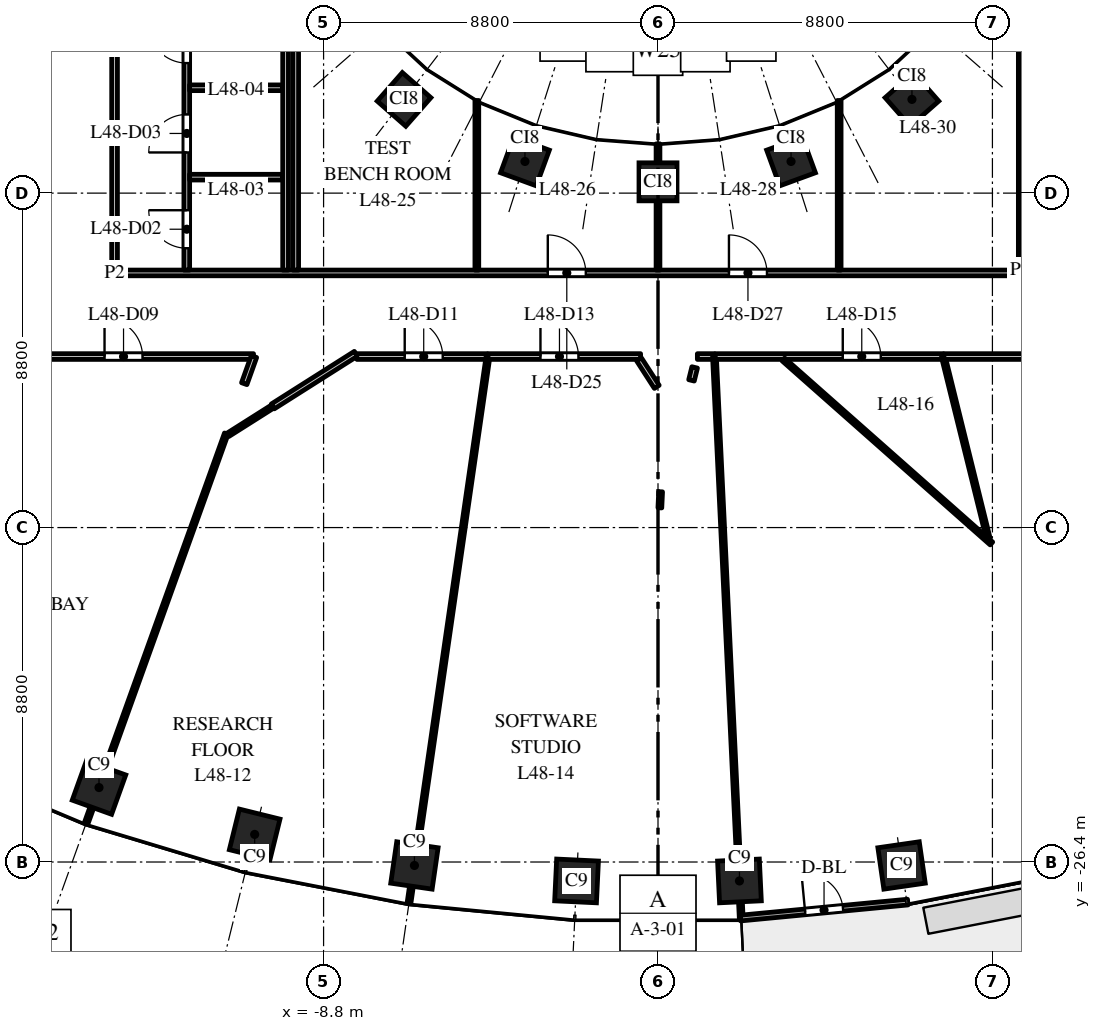
"""IFC4 building model, lengths in metres.
Left out: names, types, materials, properties, quantities, classifications, styles, units other than length and angle.
Written with IfcOpenShell. Run it as: python <this file> out.ifc"""

import sys

from ifc_helpers import new_model, si_unit, direction, frame, frame_2d, origin, origin_2d, place, context, subcontext, project, spatial, rectangle, extrude, element, fill, save


model = new_model("IFC4")
c1 = context("Model", 3, precision=1e-05, world=origin(), true_north=direction((0.0, 1.0)))
c2 = subcontext(c1, "Body", "Model", "MODEL_VIEW")
j1 = project(units=[si_unit("LENGTHUNIT", "METRE"), si_unit("PLANEANGLEUNIT", "RADIAN")], contexts=[c1])
p1 = place(None, origin())
s1 = spatial("IfcSite", under=j1, at=p1, CompositionType="ELEMENT")
p2 = place(p1, origin())
s2 = spatial("IfcBuilding", under=s1, at=p2, CompositionType="ELEMENT")
p3 = place(p2, frame((0.0, 0.0, 233.5)))
s3 = spatial("IfcBuildingStorey", under=s2, at=p3, CompositionType="ELEMENT", Elevation=233.5)
for number, where, z_axis, x_axis in (
    (1, (-14.709, -24.441, 0.0), (0.0, 0.0, 1.0), (0.941, -0.338, 0.0)),
    (2, (-10.613, -25.674, 0.0), (0.0, 0.0, 1.0), (0.971, -0.24, 0.0)),
    (3, (-6.409, -26.491, 0.0), (0.0, 0.0, 1.0), (0.99, -0.143, 0.0)),
    (4, (-2.143, -26.898, 0.0), (0.0, 0.0, 1.0), (0.999, -0.048, 0.0)),
    (5, (2.143, -26.898, 0.0), (0.0, 0.0, 1.0), (0.999, 0.048, 0.0)),
    (6, (6.409, -26.491, 0.0), (0.0, 0.0, 1.0), (0.99, 0.143, 0.0)),
):
    element("IfcColumn", number, at=place(p3, frame(where, z_axis=z_axis, x_axis=x_axis)), inside=s3, PredefinedType="COLUMN", context=c2, shape_type="SweptSolid", body=[
        extrude(rectangle(XDim=1.1, YDim=1.1, at=origin_2d()), origin(), (0.0, 0.0, 1.0), 4.0),
    ])
for number, where, z_axis, x_axis in (
    (7, (-6.682, -6.334, 0.0), (0.0, 0.0, 1.0), (0.751, -0.66, 0.0)),
    (8, (-3.501, -7.967, 0.0), (0.0, 0.0, 1.0), (0.939, -0.344, 0.0)),
    (9, (0.0, -8.503, 0.0), (0.0, 0.0, 1.0), (1.0, 0.0, 0.0)),
    (10, (3.501, -7.967, 0.0), (0.0, 0.0, 1.0), (0.939, 0.344, 0.0)),
    (11, (6.682, -6.334, 0.0), (0.0, 0.0, 1.0), (0.751, 0.66, 0.0)),
):
    element("IfcColumn", number, at=place(p3, frame(where, z_axis=z_axis, x_axis=x_axis)), inside=s3, PredefinedType="COLUMN", context=c2, shape_type="SweptSolid", body=[
        extrude(rectangle(XDim=1.0, YDim=1.0, at=origin_2d()), origin(), (0.0, 0.0, 1.0), 4.0),
    ])
p4 = place(p3, frame((2.166, -27.875, 0.0), z_axis=(0.0, 0.0, 1.0), x_axis=(0.995473879823, 0.095035543824, 0.0)))
e12 = element("IfcWall", 12, at=p4, inside=s3, PredefinedType="STANDARD", context=c2, shape_type="SweptSolid", body=[
    extrude(rectangle(XDim=4.426, YDim=0.15, at=frame_2d((2.213, 0.0))), origin(), (0.0, 0.0, 1.0), 3.7),
])
p5 = place(p4, frame((1.713, 0.0, 0.0)))
e13 = element("IfcOpeningElement", 13, at=p5, cuts=e12, PredefinedType="OPENING", context=c2, shape_type="SweptSolid", body=[
    extrude(rectangle(XDim=1.0, YDim=2.4, at=frame_2d((0.5, 1.2))), frame((0.0, 0.085, 0.0), z_axis=(0.0, -1.0, 0.0), x_axis=(1.0, 0.0, 0.0)), (0.0, 0.0, 1.0), 0.17),
])
p6 = place(p3, frame((-24.0, -13.1, 0.0), z_axis=(0.0, 0.0, 1.0), x_axis=(1.0, 0.0, 0.0)))
e14 = element("IfcWall", 14, at=p6, inside=s3, PredefinedType="PARTITIONING", context=c2, shape_type="SweptSolid", body=[
    extrude(rectangle(XDim=13.357, YDim=0.15, at=frame_2d((6.678, 0.0))), origin(), (0.0, 0.0, 1.0), 2.75),
])
p7 = place(p6, frame((9.436, 0.0, 0.0)))
e15 = element("IfcOpeningElement", 15, at=p7, cuts=e14, PredefinedType="OPENING", context=c2, shape_type="SweptSolid", body=[
    extrude(rectangle(XDim=1.0, YDim=2.1, at=frame_2d((0.5, 1.05))), frame((0.0, 0.085, 0.0), z_axis=(0.0, -1.0, 0.0), x_axis=(1.0, 0.0, 0.0)), (0.0, 0.0, 1.0), 0.17),
])
p8 = place(p3, frame((-15.048, -25.383, 0.0), z_axis=(0.0, 0.0, 1.0), x_axis=(0.338406105684, 0.941000163462, 0.0)))
e16 = element("IfcWall", 16, at=p8, inside=s3, PredefinedType="PARTITIONING", context=c2, shape_type="SweptSolid", body=[
    extrude(rectangle(XDim=10.898, YDim=0.1, at=frame_2d((5.449, 0.0))), origin(), (0.0, 0.0, 1.0), 3.0),
])
p9 = place(p3, frame((-14.3, -10.9, 0.0), z_axis=(0.0, 0.0, 1.0), x_axis=(0.0, 1.0, 0.0)))
e17 = element("IfcWall", 17, at=p9, inside=s3, PredefinedType="PARTITIONING", context=c2, shape_type="SweptSolid", body=[
    extrude(rectangle(XDim=21.8, YDim=0.15, at=frame_2d((10.9, 0.0))), origin(), (0.0, 0.0, 1.0), 2.75),
])
p10 = place(p9, frame((10.4, 0.0, 0.0)))
e18 = element("IfcOpeningElement", 18, at=p10, cuts=e17, PredefinedType="OPENING", context=c2, shape_type="SweptSolid", body=[
    extrude(rectangle(XDim=1.0, YDim=2.1, at=frame_2d((0.5, 1.05))), frame((0.0, 0.085, 0.0), z_axis=(0.0, -1.0, 0.0), x_axis=(1.0, 0.0, 0.0)), (0.0, 0.0, 1.0), 0.17),
])
p11 = place(p3, frame((-14.3, -10.9, 0.0), z_axis=(0.0, 0.0, 1.0), x_axis=(1.0, 0.0, 0.0)))
e19 = element("IfcWall", 19, at=p11, inside=s3, PredefinedType="PARTITIONING", context=c2, shape_type="SweptSolid", body=[
    extrude(rectangle(XDim=28.6, YDim=0.15, at=frame_2d((14.3, 0.0))), origin(), (0.0, 0.0, 1.0), 2.85),
])
p12 = place(p11, frame((11.4, 0.0, 0.0)))
e20 = element("IfcOpeningElement", 20, at=p12, cuts=e19, PredefinedType="OPENING", context=c2, shape_type="SweptSolid", body=[
    extrude(rectangle(XDim=1.0, YDim=2.1, at=frame_2d((0.5, 1.05))), frame((0.0, 0.085, 0.0), z_axis=(0.0, -1.0, 0.0), x_axis=(1.0, 0.0, 0.0)), (0.0, 0.0, 1.0), 0.17),
])
p13 = place(p11, frame((16.167, 0.0, 0.0)))
e21 = element("IfcOpeningElement", 21, at=p13, cuts=e19, PredefinedType="OPENING", context=c2, shape_type="SweptSolid", body=[
    extrude(rectangle(XDim=1.0, YDim=2.1, at=frame_2d((0.5, 1.05))), frame((0.0, 0.085, 0.0), z_axis=(0.0, -1.0, 0.0), x_axis=(1.0, 0.0, 0.0)), (0.0, 0.0, 1.0), 0.17),
])
p14 = place(p3, frame((-12.4, -10.825, 0.0), z_axis=(0.0, 0.0, 1.0), x_axis=(0.0, 1.0, 0.0)))
e22 = element("IfcWall", 22, at=p14, inside=s3, PredefinedType="PARTITIONING", context=c2, shape_type="SweptSolid", body=[
    extrude(rectangle(XDim=7.065, YDim=0.15, at=frame_2d((3.532, 0.0))), origin(), (0.0, 0.0, 1.0), 2.75),
])
p15 = place(p14, frame((0.575, 0.0, 0.0)))
e23 = element("IfcOpeningElement", 23, at=p15, cuts=e22, PredefinedType="OPENING", context=c2, shape_type="SweptSolid", body=[
    extrude(rectangle(XDim=1.0, YDim=2.1, at=frame_2d((0.5, 1.05))), frame((0.0, 0.085, 0.0), z_axis=(0.0, -1.0, 0.0), x_axis=(1.0, 0.0, 0.0)), (0.0, 0.0, 1.0), 0.17),
])
p16 = place(p14, frame((3.095, 0.0, 0.0)))
e24 = element("IfcOpeningElement", 24, at=p16, cuts=e22, PredefinedType="OPENING", context=c2, shape_type="SweptSolid", body=[
    extrude(rectangle(XDim=1.0, YDim=2.1, at=frame_2d((0.5, 1.05))), frame((0.0, 0.085, 0.0), z_axis=(0.0, -1.0, 0.0), x_axis=(1.0, 0.0, 0.0)), (0.0, 0.0, 1.0), 0.17),
])
p17 = place(p14, frame((5.447, 0.0, 0.0)))
e25 = element("IfcOpeningElement", 25, at=p17, cuts=e22, PredefinedType="OPENING", context=c2, shape_type="SweptSolid", body=[
    extrude(rectangle(XDim=1.0, YDim=2.1, at=frame_2d((0.5, 1.05))), frame((0.0, 0.085, 0.0), z_axis=(0.0, -1.0, 0.0), x_axis=(1.0, 0.0, 0.0)), (0.0, 0.0, 1.0), 0.17),
])
p18 = place(p3, frame((-12.325, -8.38, 0.0), z_axis=(0.0, 0.0, 1.0), x_axis=(1.0, 0.0, 0.0)))
e26 = element("IfcWall", 26, at=p18, inside=s3, PredefinedType="PARTITIONING", context=c2, shape_type="SweptSolid", body=[
    extrude(rectangle(XDim=2.45, YDim=0.15, at=frame_2d((1.225, 0.0))), origin(), (0.0, 0.0, 1.0), 2.75),
])
p19 = place(p3, frame((-12.325, -6.028, 0.0), z_axis=(0.0, 0.0, 1.0), x_axis=(1.0, 0.0, 0.0)))
e27 = element("IfcWall", 27, at=p19, inside=s3, PredefinedType="PARTITIONING", context=c2, shape_type="SweptSolid", body=[
    extrude(rectangle(XDim=2.45, YDim=0.15, at=frame_2d((1.225, 0.0))), origin(), (0.0, 0.0, 1.0), 3.7),
])
p20 = place(p3, frame((-11.319, -15.161, 0.0), z_axis=(0.0, 0.0, 1.0), x_axis=(0.845102975348, 0.534603555037, 0.0)))
e28 = element("IfcWall", 28, at=p20, inside=s3, PredefinedType="PARTITIONING", context=c2, shape_type="SweptSolid", body=[
    extrude(rectangle(XDim=1.399, YDim=0.1, at=frame_2d((0.699, 0.0))), origin(), (0.0, 0.0, 1.0), 3.7),
])
p21 = place(p3, frame((-10.888, -13.814, 0.0), z_axis=(0.0, 0.0, 1.0), x_axis=(0.337396703232, 0.941362557492, 0.0)))
e29 = element("IfcWall", 29, at=p21, inside=s3, PredefinedType="PARTITIONING", context=c2, shape_type="SweptSolid", body=[
    extrude(rectangle(XDim=0.758, YDim=0.15, at=frame_2d((0.379, 0.0))), origin(), (0.0, 0.0, 1.0), 2.85),
])
p22 = place(p3, frame((-10.137, -14.413, 0.0), z_axis=(0.0, 0.0, 1.0), x_axis=(0.844665601723, 0.535294331434, 0.0)))
e30 = element("IfcWall", 30, at=p22, inside=s3, PredefinedType="PARTITIONING", context=c2, shape_type="SweptSolid", body=[
    extrude(rectangle(XDim=2.589, YDim=0.15, at=frame_2d((1.294, 0.0))), origin(), (0.0, 0.0, 1.0), 3.7),
])
p23 = place(p3, frame((-9.8, -10.825, 0.0), z_axis=(0.0, 0.0, 1.0), x_axis=(0.0, 1.0, 0.0)))
e31 = element("IfcWall", 31, at=p23, inside=s3, PredefinedType="PARTITIONING", context=c2, shape_type="SweptSolid", body=[
    extrude(rectangle(XDim=7.065, YDim=0.15, at=frame_2d((3.532, 0.0))), origin(), (0.0, 0.0, 1.0), 2.75),
])
p24 = place(p3, frame((-9.533, -10.825, 0.0), z_axis=(0.0, 0.0, 1.0), x_axis=(0.0, 1.0, 0.0)))
e32 = element("IfcWall", 32, at=p24, inside=s3, PredefinedType="PARTITIONING", context=c2, shape_type="SweptSolid", body=[
    extrude(rectangle(XDim=21.65, YDim=0.15, at=frame_2d((10.825, 0.0))), origin(), (0.0, 0.0, 1.0), 2.75),
])
p25 = place(p24, frame((15.575, 0.0, 0.0)))
e33 = element("IfcOpeningElement", 33, at=p25, cuts=e32, PredefinedType="OPENING", context=c2, shape_type="SweptSolid", body=[
    extrude(rectangle(XDim=1.0, YDim=2.1, at=frame_2d((0.5, 1.05))), frame((0.0, 0.085, 0.0), z_axis=(0.0, -1.0, 0.0), x_axis=(1.0, 0.0, 0.0)), (0.0, 0.0, 1.0), 0.17),
])
p26 = place(p3, frame((-7.925, -13.1, 0.0), z_axis=(0.0, 0.0, 1.0), x_axis=(1.0, 0.0, 0.0)))
e34 = element("IfcWall", 34, at=p26, inside=s3, PredefinedType="PARTITIONING", context=c2, shape_type="SweptSolid", body=[
    extrude(rectangle(XDim=3.432, YDim=0.15, at=frame_2d((1.716, 0.0))), origin(), (0.0, 0.0, 1.0), 2.85),
])
p27 = place(p26, frame((1.26, 0.0, 0.0)))
e35 = element("IfcOpeningElement", 35, at=p27, cuts=e34, PredefinedType="OPENING", context=c2, shape_type="SweptSolid", body=[
    extrude(rectangle(XDim=1.0, YDim=2.1, at=frame_2d((0.5, 1.05))), frame((0.0, 0.085, 0.0), z_axis=(0.0, -1.0, 0.0), x_axis=(1.0, 0.0, 0.0)), (0.0, 0.0, 1.0), 0.17),
])
p28 = place(p3, frame((-6.552, -27.481, 0.0), z_axis=(0.0, 0.0, 1.0), x_axis=(0.143086579044, 0.989710175202, 0.0)))
e36 = element("IfcWall", 36, at=p28, inside=s3, PredefinedType="PARTITIONING", context=c2, shape_type="SweptSolid", body=[
    extrude(rectangle(XDim=14.53, YDim=0.1, at=frame_2d((7.265, 0.0))), origin(), (0.0, 0.0, 1.0), 3.0),
])
p29 = place(p3, frame((-4.767, -10.825, 0.0), z_axis=(0.0, 0.0, 1.0), x_axis=(0.0, 1.0, 0.0)))
e37 = element("IfcWall", 37, at=p29, inside=s3, PredefinedType="PARTITIONING", context=c2, shape_type="SweptSolid", body=[
    extrude(rectangle(XDim=4.462, YDim=0.1, at=frame_2d((2.231, 0.0))), origin(), (0.0, 0.0, 1.0), 3.0),
])
p30 = place(p3, frame((-4.473, -13.1, 0.0), z_axis=(0.0, 0.0, 1.0), x_axis=(1.0, 0.0, 0.0)))
e38 = element("IfcWall", 38, at=p30, inside=s3, PredefinedType="PARTITIONING", context=c2, shape_type="SweptSolid", body=[
    extrude(rectangle(XDim=4.015, YDim=0.15, at=frame_2d((2.007, 0.0))), origin(), (0.0, 0.0, 1.0), 2.85),
])
p31 = place(p30, frame((1.38, 0.0, 0.0)))
e39 = element("IfcOpeningElement", 39, at=p31, cuts=e38, PredefinedType="OPENING", context=c2, shape_type="SweptSolid", body=[
    extrude(rectangle(XDim=1.0, YDim=2.1, at=frame_2d((0.5, 1.05))), frame((0.0, 0.085, 0.0), z_axis=(0.0, -1.0, 0.0), x_axis=(1.0, 0.0, 0.0)), (0.0, 0.0, 1.0), 0.17),
])
p32 = place(p3, frame((-0.499, -13.175, 0.0), z_axis=(0.0, 0.0, 1.0), x_axis=(0.542663046007, -0.839950485742, 0.0)))
e40 = element("IfcWall", 40, at=p32, inside=s3, PredefinedType="PARTITIONING", context=c2, shape_type="SweptSolid", body=[
    extrude(rectangle(XDim=0.861, YDim=0.15, at=frame_2d((0.43, 0.0))), origin(), (0.0, 0.0, 1.0), 3.7),
])
p33 = place(p3, frame((0.0, -10.825, 0.0), z_axis=(0.0, 0.0, 1.0), x_axis=(0.0, 1.0, 0.0)))
e41 = element("IfcWall", 41, at=p33, inside=s3, PredefinedType="PARTITIONING", context=c2, shape_type="SweptSolid", body=[
    extrude(rectangle(XDim=3.321, YDim=0.1, at=frame_2d((1.661, 0.0))), origin(), (0.0, 0.0, 1.0), 3.7),
])
p34 = place(p3, frame((0.049, -17.081, 0.0), z_axis=(0.0, 0.0, 1.0), x_axis=(0.047263912187, 0.998882436829, 0.0)))
e42 = element("IfcWall", 42, at=p34, inside=s3, PredefinedType="PARTITIONING", context=c2, shape_type="SweptSolid", body=[
    extrude(rectangle(XDim=0.424, YDim=0.1, at=frame_2d((0.212, 0.0))), origin(), (0.0, 0.0, 1.0), 3.7),
])
p35 = place(p3, frame((0.881, -13.727, 0.0), z_axis=(0.0, 0.0, 1.0), x_axis=(0.239099704585, 0.970995021237, 0.0)))
e43 = element("IfcWall", 43, at=p35, inside=s3, PredefinedType="PARTITIONING", context=c2, shape_type="SweptSolid", body=[
    extrude(rectangle(XDim=0.351, YDim=0.15, at=frame_2d((0.176, 0.0))), origin(), (0.0, 0.0, 1.0), 3.7),
])
p36 = place(p3, frame((1.036, -13.1, 0.0), z_axis=(0.0, 0.0, 1.0), x_axis=(1.0, 0.0, 0.0)))
e44 = element("IfcWall", 44, at=p36, inside=s3, PredefinedType="PARTITIONING", context=c2, shape_type="SweptSolid", body=[
    extrude(rectangle(XDim=0.45, YDim=0.15, at=frame_2d((0.225, 0.0))), origin(), (0.0, 0.0, 1.0), 3.7),
])
p37 = place(p3, frame((1.486, -13.104, 0.0), z_axis=(0.0, 0.0, 1.0), x_axis=(0.047589427933, -0.998866981309, 0.0)))
e45 = element("IfcWall", 45, at=p37, inside=s3, PredefinedType="PARTITIONING", context=c2, shape_type="SweptSolid", body=[
    extrude(rectangle(XDim=14.811, YDim=0.1, at=frame_2d((7.405, 0.0))), origin(), (0.0, 0.0, 1.0), 3.0),
])
p38 = place(p3, frame((1.506, -13.1, 0.0), z_axis=(0.0, 0.0, 1.0), x_axis=(1.0, 0.0, 0.0)))
e46 = element("IfcWall", 46, at=p38, inside=s3, PredefinedType="PARTITIONING", context=c2, shape_type="SweptSolid", body=[
    extrude(rectangle(XDim=6.001, YDim=0.15, at=frame_2d((3.0, 0.0))), origin(), (0.0, 0.0, 1.0), 2.85),
])
p39 = place(p38, frame((3.356, 0.0, 0.0)))
e47 = element("IfcOpeningElement", 47, at=p39, cuts=e46, PredefinedType="OPENING", context=c2, shape_type="SweptSolid", body=[
    extrude(rectangle(XDim=1.0, YDim=2.1, at=frame_2d((0.5, 1.05))), frame((0.0, 0.085, 0.0), z_axis=(0.0, -1.0, 0.0), x_axis=(1.0, 0.0, 0.0)), (0.0, 0.0, 1.0), 0.17),
])
p40 = place(p3, frame((3.3, -13.178, 0.0), z_axis=(0.0, 0.0, 1.0), x_axis=(0.749078819432, -0.662480884462, 0.0)))
e48 = element("IfcWall", 48, at=p40, inside=s3, PredefinedType="PARTITIONING", context=c2, shape_type="SweptSolid", body=[
    extrude(rectangle(XDim=7.307, YDim=0.1, at=frame_2d((3.654, 0.0))), origin(), (0.0, 0.0, 1.0), 3.7),
])
p41 = place(p3, frame((4.767, -10.825, 0.0), z_axis=(0.0, 0.0, 1.0), x_axis=(0.0, 1.0, 0.0)))
e49 = element("IfcWall", 49, at=p41, inside=s3, PredefinedType="PARTITIONING", context=c2, shape_type="SweptSolid", body=[
    extrude(rectangle(XDim=4.462, YDim=0.1, at=frame_2d((2.231, 0.0))), origin(), (0.0, 0.0, 1.0), 2.85),
])
p42 = place(p3, frame((7.507, -13.1, 0.0), z_axis=(0.0, 0.0, 1.0), x_axis=(0.239848980266, -0.970810211455, 0.0)))
e50 = element("IfcWall", 50, at=p42, inside=s3, PredefinedType="PARTITIONING", context=c2, shape_type="SweptSolid", body=[
    extrude(rectangle(XDim=4.919, YDim=0.1, at=frame_2d((2.46, 0.0))), origin(), (0.0, 0.0, 1.0), 3.7),
])
p43 = place(p3, frame((7.524, -13.1, 0.0), z_axis=(0.0, 0.0, 1.0), x_axis=(1.0, 0.0, 0.0)))
e51 = element("IfcWall", 51, at=p43, inside=s3, PredefinedType="PARTITIONING", context=c2, shape_type="SweptSolid", body=[
    extrude(rectangle(XDim=16.476, YDim=0.15, at=frame_2d((8.238, 0.0))), origin(), (0.0, 0.0, 1.0), 2.85),
])
p44 = place(p43, frame((2.633, 0.0, 0.0)))
e52 = element("IfcOpeningElement", 52, at=p44, cuts=e51, PredefinedType="OPENING", context=c2, shape_type="SweptSolid", body=[
    extrude(rectangle(XDim=1.0, YDim=2.1, at=frame_2d((0.5, 1.05))), frame((0.0, 0.085, 0.0), z_axis=(0.0, -1.0, 0.0), x_axis=(1.0, 0.0, 0.0)), (0.0, 0.0, 1.0), 0.17),
])
p45 = place(p43, frame((9.787, 0.0, 0.0)))
e53 = element("IfcOpeningElement", 53, at=p45, cuts=e51, PredefinedType="OPENING", context=c2, shape_type="SweptSolid", body=[
    extrude(rectangle(XDim=1.0, YDim=2.1, at=frame_2d((0.5, 1.05))), frame((0.0, 0.085, 0.0), z_axis=(0.0, -1.0, 0.0), x_axis=(1.0, 0.0, 0.0)), (0.0, 0.0, 1.0), 0.17),
])
p46 = place(p3, frame((9.533, -10.825, 0.0), z_axis=(0.0, 0.0, 1.0), x_axis=(0.0, 1.0, 0.0)))
e54 = element("IfcWall", 54, at=p46, inside=s3, PredefinedType="PARTITIONING", context=c2, shape_type="SweptSolid", body=[
    extrude(rectangle(XDim=21.65, YDim=0.1, at=frame_2d((10.825, 0.0))), origin(), (0.0, 0.0, 1.0), 2.75),
])
p47 = place(p5, origin())
e55 = element("IfcDoor", 55, at=p47, inside=s3, OperationType="SINGLE_SWING_LEFT", PredefinedType="DOOR", context=c2, shape_type="SweptSolid", body=[
    extrude(rectangle(XDim=1.0, YDim=2.4, at=frame_2d((0.5, 1.2))), frame((0.0, 0.025, 0.0), z_axis=(0.0, -1.0, 0.0), x_axis=(1.0, 0.0, 0.0)), (0.0, 0.0, 1.0), 0.05),
])
fill(e13, e55)
p48 = place(p15, origin())
e56 = element("IfcDoor", 56, at=p48, inside=s3, OperationType="SINGLE_SWING_RIGHT", PredefinedType="DOOR", context=c2, shape_type="SweptSolid", body=[
    extrude(rectangle(XDim=1.0, YDim=2.1, at=frame_2d((0.5, 1.05))), frame((0.0, 0.025, 0.0), z_axis=(0.0, -1.0, 0.0), x_axis=(1.0, 0.0, 0.0)), (0.0, 0.0, 1.0), 0.05),
])
fill(e23, e56)
p49 = place(p16, origin())
e57 = element("IfcDoor", 57, at=p49, inside=s3, OperationType="SINGLE_SWING_LEFT", PredefinedType="DOOR", context=c2, shape_type="SweptSolid", body=[
    extrude(rectangle(XDim=1.0, YDim=2.1, at=frame_2d((0.5, 1.05))), frame((0.0, 0.025, 0.0), z_axis=(0.0, -1.0, 0.0), x_axis=(1.0, 0.0, 0.0)), (0.0, 0.0, 1.0), 0.05),
])
fill(e24, e57)
p50 = place(p17, origin())
e58 = element("IfcDoor", 58, at=p50, inside=s3, OperationType="SINGLE_SWING_RIGHT", PredefinedType="DOOR", context=c2, shape_type="SweptSolid", body=[
    extrude(rectangle(XDim=1.0, YDim=2.1, at=frame_2d((0.5, 1.05))), frame((0.0, 0.025, 0.0), z_axis=(0.0, -1.0, 0.0), x_axis=(1.0, 0.0, 0.0)), (0.0, 0.0, 1.0), 0.05),
])
fill(e25, e58)
p51 = place(p7, origin())
e59 = element("IfcDoor", 59, at=p51, inside=s3, OperationType="SINGLE_SWING_LEFT", PredefinedType="DOOR", context=c2, shape_type="SweptSolid", body=[
    extrude(rectangle(XDim=1.0, YDim=2.1, at=frame_2d((0.5, 1.05))), frame((0.0, 0.025, 0.0), z_axis=(0.0, -1.0, 0.0), x_axis=(1.0, 0.0, 0.0)), (0.0, 0.0, 1.0), 0.05),
])
fill(e15, e59)
p52 = place(p27, origin())
e60 = element("IfcDoor", 60, at=p52, inside=s3, OperationType="SINGLE_SWING_LEFT", PredefinedType="DOOR", context=c2, shape_type="SweptSolid", body=[
    extrude(rectangle(XDim=1.0, YDim=2.1, at=frame_2d((0.5, 1.05))), frame((0.0, 0.025, 0.0), z_axis=(0.0, -1.0, 0.0), x_axis=(1.0, 0.0, 0.0)), (0.0, 0.0, 1.0), 0.05),
])
fill(e35, e60)
p53 = place(p31, origin())
e61 = element("IfcDoor", 61, at=p53, inside=s3, OperationType="SINGLE_SWING_LEFT", PredefinedType="DOOR", context=c2, shape_type="SweptSolid", body=[
    extrude(rectangle(XDim=1.0, YDim=2.1, at=frame_2d((0.5, 1.05))), frame((0.0, 0.025, 0.0), z_axis=(0.0, -1.0, 0.0), x_axis=(1.0, 0.0, 0.0)), (0.0, 0.0, 1.0), 0.05),
])
fill(e39, e61)
p54 = place(p39, origin())
e62 = element("IfcDoor", 62, at=p54, inside=s3, OperationType="SINGLE_SWING_LEFT", PredefinedType="DOOR", context=c2, shape_type="SweptSolid", body=[
    extrude(rectangle(XDim=1.0, YDim=2.1, at=frame_2d((0.5, 1.05))), frame((0.0, 0.025, 0.0), z_axis=(0.0, -1.0, 0.0), x_axis=(1.0, 0.0, 0.0)), (0.0, 0.0, 1.0), 0.05),
])
fill(e47, e62)
p55 = place(p12, origin())
e63 = element("IfcDoor", 63, at=p55, inside=s3, OperationType="SINGLE_SWING_LEFT", PredefinedType="DOOR", context=c2, shape_type="SweptSolid", body=[
    extrude(rectangle(XDim=1.0, YDim=2.1, at=frame_2d((0.5, 1.05))), frame((0.0, 0.025, 0.0), z_axis=(0.0, -1.0, 0.0), x_axis=(1.0, 0.0, 0.0)), (0.0, 0.0, 1.0), 0.05),
])
fill(e20, e63)
p56 = place(p13, origin())
e64 = element("IfcDoor", 64, at=p56, inside=s3, OperationType="SINGLE_SWING_LEFT", PredefinedType="DOOR", context=c2, shape_type="SweptSolid", body=[
    extrude(rectangle(XDim=1.0, YDim=2.1, at=frame_2d((0.5, 1.05))), frame((0.0, 0.025, 0.0), z_axis=(0.0, -1.0, 0.0), x_axis=(1.0, 0.0, 0.0)), (0.0, 0.0, 1.0), 0.05),
])
fill(e21, e64)
save(model, sys.argv[1])
